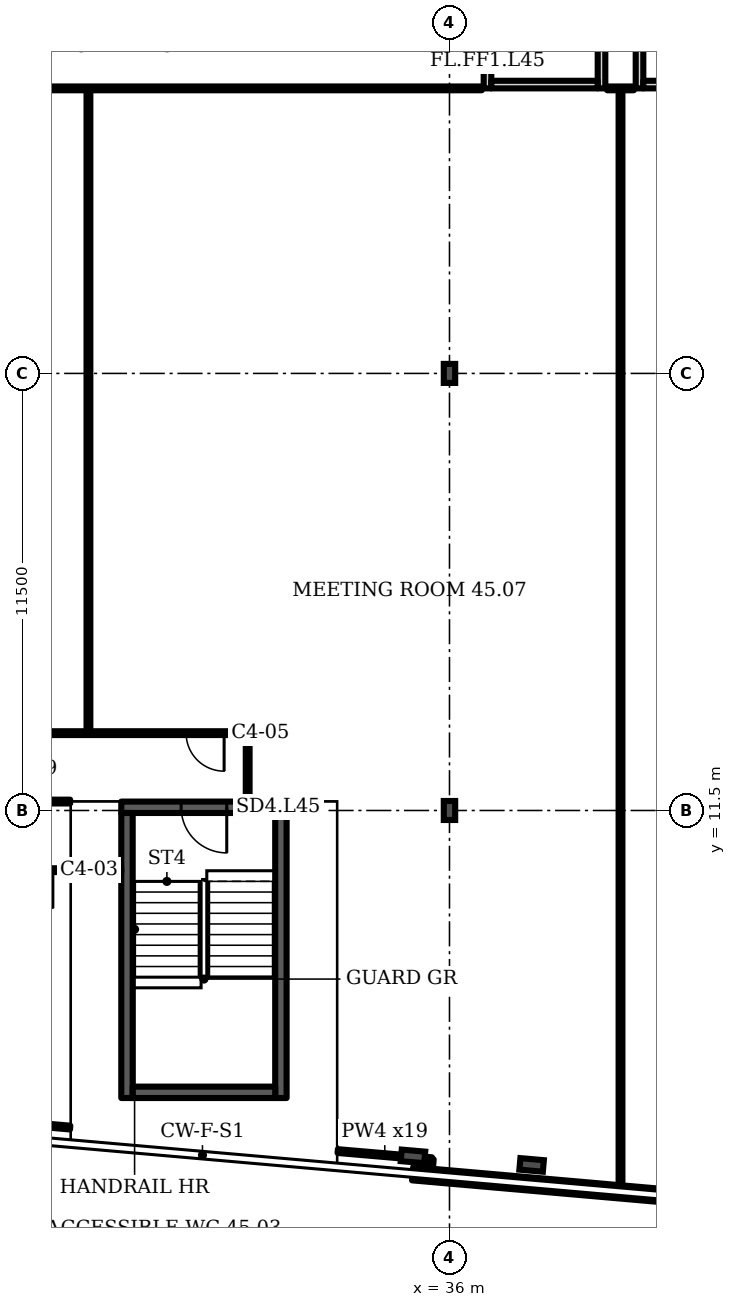
"""IFC4 building model, lengths in metres.
Left out: names, types, materials, properties, quantities, classifications, styles, units other than length and angle.
Written with IfcOpenShell. Run it as: python <this file> out.ifc"""

import sys

from ifc_helpers import new_model, si_unit, direction, frame, frame_2d, origin, origin_2d, place, context, subcontext, project, spatial, rectangle, i_section, extrude, element, fill, save


model = new_model("IFC4")
c1 = context("Model", 3, precision=1e-05, world=origin(), true_north=direction((0.0, 1.0)))
c2 = subcontext(c1, "Body", "Model", "MODEL_VIEW")
j1 = project(units=[si_unit("LENGTHUNIT", "METRE"), si_unit("PLANEANGLEUNIT", "RADIAN")], contexts=[c1])
p1 = place(None, origin())
s1 = spatial("IfcSite", under=j1, at=p1, CompositionType="ELEMENT")
p2 = place(p1, origin())
s2 = spatial("IfcBuilding", under=s1, at=p2, CompositionType="ELEMENT")
p3 = place(p2, frame((0.0, 0.0, 184.3)))
s3 = spatial("IfcBuildingStorey", under=s2, at=p3, CompositionType="ELEMENT", Elevation=184.3)
for number, where, z_axis, x_axis in (
    (1, (35.039, 2.399, 0.0), (0.0, 0.0, 1.0), (-0.087, -0.996, 0.0)),
    (2, (38.161, 2.174, 0.0), (0.0, 0.0, 1.0), (-0.087, -0.996, 0.0)),
):
    element("IfcColumn", number, at=place(p3, frame(where, z_axis=z_axis, x_axis=x_axis)), inside=s3, PredefinedType="COLUMN", context=c2, shape_type="SweptSolid", body=[
        extrude(i_section(OverallWidth=0.305, OverallDepth=0.62, WebThickness=0.021, FlangeThickness=0.04, FilletRadius=0.027, at=origin_2d()), origin(), (0.0, 0.0, 1.0), 3.6),
    ])
for number, where, z_axis, x_axis in (
    (3, (36.0, 11.5, 0.0), (0.0, 0.0, 1.0), (1.0, 0.0, 0.0)),
    (4, (36.0, 23.0, 0.0), (0.0, 0.0, 1.0), (1.0, 0.0, 0.0)),
):
    element("IfcColumn", number, at=place(p3, frame(where, z_axis=z_axis, x_axis=x_axis)), inside=s3, PredefinedType="COLUMN", context=c2, shape_type="SweptSolid", body=[
        extrude(i_section(OverallWidth=0.3, OverallDepth=0.5, WebThickness=0.014, FlangeThickness=0.028, FilletRadius=0.027, at=origin_2d()), origin(), (0.0, 0.0, 1.0), 3.6),
    ])
p4 = place(p3, frame((35.03, 1.943, 0.0), z_axis=(0.0, 0.0, 1.0), x_axis=(0.996199, -0.08714, 0.0)))
e5 = element("IfcWall", 5, at=p4, inside=s3, PredefinedType="SOLIDWALL", context=c2, shape_type="SweptSolid", body=[
    extrude(rectangle(XDim=11.028, YDim=0.35, at=frame_2d((5.514, 0.0))), origin(), (0.0, 0.0, 1.0), 1.0),
])
p5 = place(p3, frame((37.0, 30.5, 0.0), z_axis=(0.0, 0.0, 1.0), x_axis=(0.0, 1.0, 0.0)))
e6 = element("IfcWall", 6, at=p5, inside=s3, PredefinedType="PARTITIONING", context=c2, shape_type="SweptSolid", body=[
    extrude(rectangle(XDim=3.5, YDim=0.2, at=frame_2d((1.75, 0.0))), origin(), (0.0, 0.0, 1.0), 3.2),
])
p6 = place(p5, frame((1.2, 0.0, 0.0)))
e7 = element("IfcOpeningElement", 7, at=p6, cuts=e6, PredefinedType="OPENING", context=c2, shape_type="SweptSolid", body=[
    extrude(rectangle(XDim=1.1, YDim=2.1, at=frame_2d((0.55, 1.05))), frame((0.0, 0.11, 0.0), z_axis=(0.0, -1.0, 0.0), x_axis=(1.0, 0.0, 0.0)), (0.0, 0.0, 1.0), 0.22),
])
p7 = place(p3, frame((40.0, 30.5, 0.0), z_axis=(0.0, 0.0, 1.0), x_axis=(0.0, 1.0, 0.0)))
e8 = element("IfcWall", 8, at=p7, inside=s3, PredefinedType="PARTITIONING", context=c2, shape_type="SweptSolid", body=[
    extrude(rectangle(XDim=3.5, YDim=0.2, at=frame_2d((1.75, 0.0))), origin(), (0.0, 0.0, 1.0), 3.2),
])
p8 = place(p3, frame((37.1, 30.6, 0.0), z_axis=(0.0, 0.0, 1.0), x_axis=(1.0, 0.0, 0.0)))
e9 = element("IfcWall", 9, at=p8, inside=s3, PredefinedType="PARTITIONING", context=c2, shape_type="SweptSolid", body=[
    extrude(rectangle(XDim=2.8, YDim=0.2, at=frame_2d((1.4, 0.0))), origin(), (0.0, 0.0, 1.0), 3.2),
])
p9 = place(p3, frame((41.0, 30.5, 0.0), z_axis=(0.0, 0.0, 1.0), x_axis=(0.0, 1.0, 0.0)))
e10 = element("IfcWall", 10, at=p9, inside=s3, PredefinedType="PARTITIONING", context=c2, shape_type="SweptSolid", body=[
    extrude(rectangle(XDim=3.5, YDim=0.2, at=frame_2d((1.75, 0.0))), origin(), (0.0, 0.0, 1.0), 3.2),
])
p10 = place(p3, frame((41.1, 30.6, 0.0), z_axis=(0.0, 0.0, 1.0), x_axis=(1.0, 0.0, 0.0)))
e11 = element("IfcWall", 11, at=p10, inside=s3, PredefinedType="PARTITIONING", context=c2, shape_type="SweptSolid", body=[
    extrude(rectangle(XDim=2.8, YDim=0.2, at=frame_2d((1.4, 0.0))), origin(), (0.0, 0.0, 1.0), 3.2),
])
p11 = place(p3, frame((27.364, 11.584, 0.0), z_axis=(0.0, 0.0, 1.0), x_axis=(1.0, 0.0, 0.0)))
e12 = element("IfcWall", 12, at=p11, inside=s3, PredefinedType="SHEAR", context=c2, shape_type="SweptSolid", body=[
    extrude(rectangle(XDim=4.35, YDim=0.3, at=frame_2d((2.175, 0.0))), origin(), (0.0, 0.0, 1.0), 3.2),
])
p12 = place(p11, frame((1.575, 0.0, 0.0)))
e13 = element("IfcOpeningElement", 13, at=p12, cuts=e12, PredefinedType="OPENING", context=c2, shape_type="SweptSolid", body=[
    extrude(rectangle(XDim=1.2, YDim=2.1, at=frame_2d((0.6, 1.05))), frame((0.0, 0.16, 0.0), z_axis=(0.0, -1.0, 0.0), x_axis=(1.0, 0.0, 0.0)), (0.0, 0.0, 1.0), 0.32),
])
p13 = place(p3, frame((16.9, 11.735, 0.0), z_axis=(0.0, 0.0, 1.0), x_axis=(1.0, 0.0, 0.0)))
e14 = element("IfcWall", 14, at=p13, inside=s3, PredefinedType="PARTITIONING", context=c2, shape_type="SweptSolid", body=[
    extrude(rectangle(XDim=9.119, YDim=0.1, at=frame_2d((4.56, 0.0))), origin(), (0.0, 0.0, 1.0), 3.2),
])
p14 = place(p13, frame((0.155, 0.0, 0.0)))
e15 = element("IfcOpeningElement", 15, at=p14, cuts=e14, PredefinedType="OPENING", context=c2, shape_type="SweptSolid", body=[
    extrude(rectangle(XDim=1.8, YDim=2.1, at=frame_2d((0.9, 1.05))), frame((0.0, 0.06, 0.0), z_axis=(0.0, -1.0, 0.0), x_axis=(1.0, 0.0, 0.0)), (0.0, 0.0, 1.0), 0.12),
])
p15 = place(p3, frame((17.8, 30.5, 0.0), z_axis=(0.0, 0.0, 1.0), x_axis=(1.0, 0.0, 0.0)))
e16 = element("IfcWall", 16, at=p15, inside=s3, PredefinedType="PARTITIONING", context=c2, shape_type="SweptSolid", body=[
    extrude(rectangle(XDim=19.05, YDim=0.1, at=frame_2d((9.525, 0.0))), origin(), (0.0, 0.0, 1.0), 3.2),
])
p16 = place(p3, frame((18.5, 9.93, 0.0), z_axis=(0.0, 0.0, 1.0), x_axis=(1.0, 0.0, 0.0)))
e17 = element("IfcWall", 17, at=p16, inside=s3, PredefinedType="PARTITIONING", context=c2, shape_type="SweptSolid", body=[
    extrude(rectangle(XDim=8.864, YDim=0.1, at=frame_2d((4.432, 0.0))), origin(), (0.0, 0.0, 1.0), 3.2),
])
p17 = place(p16, frame((1.073, 0.0, 0.0)))
e18 = element("IfcOpeningElement", 18, at=p17, cuts=e17, PredefinedType="OPENING", context=c2, shape_type="SweptSolid", body=[
    extrude(rectangle(XDim=0.9, YDim=2.1, at=frame_2d((0.45, 1.05))), frame((0.0, 0.06, 0.0), z_axis=(0.0, -1.0, 0.0), x_axis=(1.0, 0.0, 0.0)), (0.0, 0.0, 1.0), 0.12),
])
p18 = place(p16, frame((3.808, 0.0, 0.0)))
e19 = element("IfcOpeningElement", 19, at=p18, cuts=e17, PredefinedType="OPENING", context=c2, shape_type="SweptSolid", body=[
    extrude(rectangle(XDim=0.9, YDim=2.1, at=frame_2d((0.45, 1.05))), frame((0.0, 0.06, 0.0), z_axis=(0.0, -1.0, 0.0), x_axis=(1.0, 0.0, 0.0)), (0.0, 0.0, 1.0), 0.12),
])
p19 = place(p16, frame((6.063, 0.0, 0.0)))
e20 = element("IfcOpeningElement", 20, at=p19, cuts=e17, PredefinedType="OPENING", context=c2, shape_type="SweptSolid", body=[
    extrude(rectangle(XDim=1.0, YDim=2.1, at=frame_2d((0.5, 1.05))), frame((0.0, 0.06, 0.0), z_axis=(0.0, -1.0, 0.0), x_axis=(1.0, 0.0, 0.0)), (0.0, 0.0, 1.0), 0.12),
])
p20 = place(p3, frame((18.7, 13.535, 0.0), z_axis=(0.0, 0.0, 1.0), x_axis=(1.0, 0.0, 0.0)))
e21 = element("IfcWall", 21, at=p20, inside=s3, PredefinedType="PARTITIONING", context=c2, shape_type="SweptSolid", body=[
    extrude(rectangle(XDim=11.99, YDim=0.1, at=frame_2d((5.995, 0.0))), origin(), (0.0, 0.0, 1.0), 3.2),
])
p21 = place(p20, frame((10.37, 0.0, 0.0)))
e22 = element("IfcOpeningElement", 22, at=p21, cuts=e21, PredefinedType="OPENING", context=c2, shape_type="SweptSolid", body=[
    extrude(rectangle(XDim=1.0, YDim=2.1, at=frame_2d((0.5, 1.05))), frame((0.0, 0.06, 0.0), z_axis=(0.0, -1.0, 0.0), x_axis=(1.0, 0.0, 0.0)), (0.0, 0.0, 1.0), 0.12),
])
p22 = place(p3, frame((26.019, 3.157, 0.0), z_axis=(0.0, 0.0, 1.0), x_axis=(-0.996266, 0.086322, 0.0)))
e23 = element("IfcWall", 23, at=p22, inside=s3, PredefinedType="PARTITIONING", context=c2, shape_type="SweptSolid", body=[
    extrude(rectangle(XDim=4.556, YDim=0.1, at=frame_2d((2.278, 0.0))), origin(), (0.0, 0.0, 1.0), 2.58),
])
p23 = place(p3, frame((26.5, 13.535, 0.0), z_axis=(0.0, 0.0, 1.0), x_axis=(0.0, 1.0, 0.0)))
e24 = element("IfcWall", 24, at=p23, inside=s3, PredefinedType="PARTITIONING", context=c2, shape_type="SweptSolid", body=[
    extrude(rectangle(XDim=16.965, YDim=0.1, at=frame_2d((8.482, 0.0))), origin(), (0.0, 0.0, 1.0), 3.2),
])
p24 = place(p3, frame((30.69, 11.754, 0.0), z_axis=(0.0, 0.0, 1.0), x_axis=(0.0, 1.0, 0.0)))
e25 = element("IfcWall", 25, at=p24, inside=s3, PredefinedType="PARTITIONING", context=c2, shape_type="SweptSolid", body=[
    extrude(rectangle(XDim=1.781, YDim=0.1, at=frame_2d((0.89, 0.0))), origin(), (0.0, 0.0, 1.0), 3.2),
])
p25 = place(p3, frame((35.502, 1.927, 0.0), z_axis=(0.0, 0.0, 1.0), x_axis=(0.083045, 0.996542, 0.0)))
e26 = element("IfcWall", 26, at=p25, inside=s3, PredefinedType="PARTITIONING", context=c2, shape_type="SweptSolid", body=[
    extrude(rectangle(XDim=0.4, YDim=0.1, at=frame_2d((0.2, 0.0))), origin(), (0.0, 0.0, 1.0), 3.2),
])
p26 = place(p3, frame((35.535, 2.325, 0.0), z_axis=(0.0, 0.0, 1.0), x_axis=(-0.996311, 0.085867, 0.0)))
e27 = element("IfcWall", 27, at=p26, inside=s3, PredefinedType="PARTITIONING", context=c2, shape_type="SweptSolid", body=[
    extrude(rectangle(XDim=2.485, YDim=0.1, at=frame_2d((1.243, 0.0))), origin(), (0.0, 0.0, 1.0), 2.58),
])
p27 = place(p3, frame((40.5, 1.489, 0.0), z_axis=(0.0, 0.0, 1.0), x_axis=(0.0, 1.0, 0.0)))
e28 = element("IfcWall", 28, at=p27, inside=s3, PredefinedType="PARTITIONING", context=c2, shape_type="SweptSolid", body=[
    extrude(rectangle(XDim=29.011, YDim=0.1, at=frame_2d((14.505, 0.0))), origin(), (0.0, 0.0, 1.0), 3.2),
])
p28 = place(p3, frame((40.15, 30.5, 0.0), z_axis=(0.0, 0.0, 1.0), x_axis=(1.0, 0.0, 0.0)))
e29 = element("IfcWall", 29, at=p28, inside=s3, PredefinedType="PARTITIONING", context=c2, shape_type="SweptSolid", body=[
    extrude(rectangle(XDim=0.7, YDim=0.1, at=frame_2d((0.35, 0.0))), origin(), (0.0, 0.0, 1.0), 3.2),
])
for number, where, z_axis, x_axis in (
    (30, (27.514, 3.934, 0.0), (0.0, 0.0, 1.0), (0.0, 1.0, 0.0)),
    (31, (31.564, 3.934, 0.0), (0.0, 0.0, 1.0), (0.0, 1.0, 0.0)),
):
    element("IfcWall", number, at=place(p3, frame(where, z_axis=z_axis, x_axis=x_axis)), inside=s3, PredefinedType="SHEAR", context=c2, shape_type="SweptSolid", body=[
        extrude(rectangle(XDim=7.5, YDim=0.3, at=frame_2d((3.75, 0.0))), origin(), (0.0, 0.0, 1.0), 3.2),
    ])
p29 = place(p3, frame((27.664, 4.084, 0.0), z_axis=(0.0, 0.0, 1.0), x_axis=(1.0, 0.0, 0.0)))
e32 = element("IfcWall", 32, at=p29, inside=s3, PredefinedType="SHEAR", context=c2, shape_type="SweptSolid", body=[
    extrude(rectangle(XDim=3.75, YDim=0.3, at=frame_2d((1.875, 0.0))), origin(), (0.0, 0.0, 1.0), 3.2),
])
p30 = place(p12, origin())
e33 = element("IfcDoor", 33, at=p30, inside=s3, OperationType="SINGLE_SWING_RIGHT", PredefinedType="DOOR", context=c2, shape_type="SweptSolid", body=[
    extrude(rectangle(XDim=1.2, YDim=2.1, at=frame_2d((0.6, 1.05))), frame((0.0, 0.025, 0.0), z_axis=(0.0, -1.0, 0.0), x_axis=(1.0, 0.0, 0.0)), (0.0, 0.0, 1.0), 0.05),
])
fill(e13, e33)
p31 = place(p19, origin())
e34 = element("IfcDoor", 34, at=p31, inside=s3, OperationType="SINGLE_SWING_RIGHT", PredefinedType="DOOR", context=c2, shape_type="SweptSolid", body=[
    extrude(rectangle(XDim=1.0, YDim=2.1, at=frame_2d((0.5, 1.05))), frame((0.0, 0.025, 0.0), z_axis=(0.0, -1.0, 0.0), x_axis=(1.0, 0.0, 0.0)), (0.0, 0.0, 1.0), 0.05),
])
fill(e20, e34)
p32 = place(p21, origin())
e35 = element("IfcDoor", 35, at=p32, inside=s3, OperationType="SINGLE_SWING_RIGHT", PredefinedType="DOOR", context=c2, shape_type="SweptSolid", body=[
    extrude(rectangle(XDim=1.0, YDim=2.1, at=frame_2d((0.5, 1.05))), frame((0.0, 0.025, 0.0), z_axis=(0.0, -1.0, 0.0), x_axis=(1.0, 0.0, 0.0)), (0.0, 0.0, 1.0), 0.05),
])
fill(e22, e35)
save(model, sys.argv[1])
